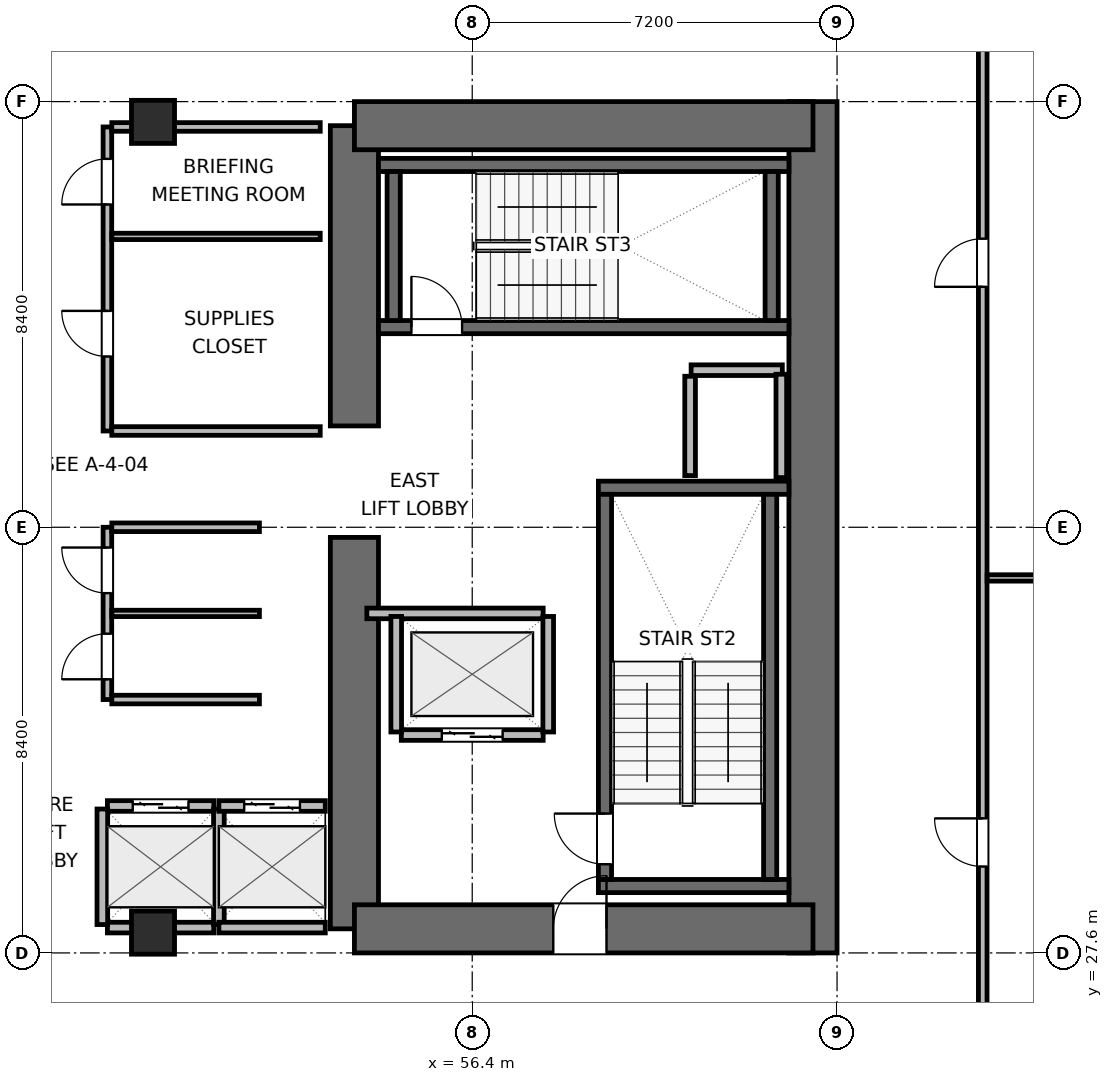
"""IFC4 building model, lengths in metres.
Left out: names, types, materials, properties, quantities, classifications, styles, units other than length and angle.
Written with IfcOpenShell. Run it as: python <this file> out.ifc"""

import sys

from ifc_helpers import new_model, si_unit, direction, frame, frame_2d, origin, origin_2d, place, context, subcontext, project, spatial, rectangle, extrude, element, fill, save


model = new_model("IFC4")
c1 = context("Model", 3, precision=1e-05, world=origin(), true_north=direction((0.0, 1.0)))
c2 = subcontext(c1, "Body", "Model", "MODEL_VIEW")
j1 = project(units=[si_unit("LENGTHUNIT", "METRE"), si_unit("PLANEANGLEUNIT", "RADIAN")], contexts=[c1])
p1 = place(None, origin())
s1 = spatial("IfcSite", under=j1, at=p1, CompositionType="ELEMENT")
p2 = place(p1, origin())
s2 = spatial("IfcBuilding", under=s1, at=p2, CompositionType="ELEMENT")
p3 = place(p2, frame((0.0, 0.0, 76.8)))
s3 = spatial("IfcBuildingStorey", under=s2, at=p3, CompositionType="ELEMENT", Elevation=76.8)
p4 = place(p3, frame((54.075, 28.075, 0.0), z_axis=(0.0, 0.0, 1.0), x_axis=(0.0, 1.0, 0.0)))
e1 = element("IfcWall", 1, at=p4, inside=s3, PredefinedType="SHEAR", context=c2, shape_type="SweptSolid", body=[
    extrude(rectangle(XDim=7.725, YDim=0.95, at=frame_2d((3.863, 0.0))), origin(), (0.0, 0.0, 1.0), 3.9),
])
p5 = place(p3, frame((54.075, 38.0, 0.0), z_axis=(0.0, 0.0, 1.0), x_axis=(0.0, 1.0, 0.0)))
e2 = element("IfcWall", 2, at=p5, inside=s3, PredefinedType="SHEAR", context=c2, shape_type="SweptSolid", body=[
    extrude(rectangle(XDim=5.925, YDim=0.95, at=frame_2d((2.962, 0.0))), origin(), (0.0, 0.0, 1.0), 3.9),
])
p6 = place(p3, frame((63.125, 27.6, 0.0), z_axis=(0.0, 0.0, 1.0), x_axis=(0.0, 1.0, 0.0)))
e3 = element("IfcWall", 3, at=p6, inside=s3, PredefinedType="SHEAR", context=c2, shape_type="SweptSolid", body=[
    extrude(rectangle(XDim=16.8, YDim=0.95, at=frame_2d((8.4, 0.0))), origin(), (0.0, 0.0, 1.0), 3.9),
])
p7 = place(p3, frame((54.075, 28.075, 0.0), z_axis=(0.0, 0.0, 1.0), x_axis=(1.0, 0.0, 0.0)))
e4 = element("IfcWall", 4, at=p7, inside=s3, PredefinedType="SHEAR", context=c2, shape_type="SweptSolid", body=[
    extrude(rectangle(XDim=9.05, YDim=0.95, at=frame_2d((4.525, 0.0))), origin(), (0.0, 0.0, 1.0), 3.9),
])
p8 = place(p7, frame((3.925, 0.0, 0.0)))
e5 = element("IfcOpeningElement", 5, at=p8, cuts=e4, PredefinedType="OPENING", context=c2, shape_type="SweptSolid", body=[
    extrude(rectangle(XDim=1.05, YDim=2.04, at=frame_2d((0.525, 1.02))), frame((0.0, 0.485, 0.0), z_axis=(0.0, -1.0, 0.0), x_axis=(1.0, 0.0, 0.0)), (0.0, 0.0, 1.0), 0.97),
])
p9 = place(p3, frame((54.075, 43.925, 0.0), z_axis=(0.0, 0.0, 1.0), x_axis=(1.0, 0.0, 0.0)))
e6 = element("IfcWall", 6, at=p9, inside=s3, PredefinedType="SHEAR", context=c2, shape_type="SweptSolid", body=[
    extrude(rectangle(XDim=9.05, YDim=0.95, at=frame_2d((4.525, 0.0))), origin(), (0.0, 0.0, 1.0), 3.9),
])
for number, where, z_axis, x_axis in (
    (7, (58.89, 28.92, 0.0), (0.0, 0.0, 1.0), (1.0, 0.0, 0.0)),
    (8, (58.89, 36.78, 0.0), (0.0, 0.0, 1.0), (1.0, 0.0, 0.0)),
):
    element("IfcWall", number, at=place(p3, frame(where, z_axis=z_axis, x_axis=x_axis)), inside=s3, PredefinedType="SHEAR", context=c2, shape_type="SweptSolid", body=[
        extrude(rectangle(XDim=3.76, YDim=0.26, at=frame_2d((1.88, 0.0))), origin(), (0.0, 0.0, 1.0), 3.9),
    ])
p10 = place(p3, frame((59.02, 29.05, 0.0), z_axis=(0.0, 0.0, 1.0), x_axis=(0.0, 1.0, 0.0)))
e9 = element("IfcWall", 9, at=p10, inside=s3, PredefinedType="SHEAR", context=c2, shape_type="SweptSolid", body=[
    extrude(rectangle(XDim=7.6, YDim=0.26, at=frame_2d((3.8, 0.0))), origin(), (0.0, 0.0, 1.0), 3.9),
])
p11 = place(p10, frame((0.3, 0.0, 0.0)))
e10 = element("IfcOpeningElement", 10, at=p11, cuts=e9, PredefinedType="OPENING", context=c2, shape_type="SweptSolid", body=[
    extrude(rectangle(XDim=1.0, YDim=2.04, at=frame_2d((0.5, 1.02))), frame((0.0, 0.14, 0.0), z_axis=(0.0, -1.0, 0.0), x_axis=(1.0, 0.0, 0.0)), (0.0, 0.0, 1.0), 0.28),
])
p12 = place(p3, frame((62.28, 29.05, 0.0), z_axis=(0.0, 0.0, 1.0), x_axis=(0.0, 1.0, 0.0)))
e11 = element("IfcWall", 11, at=p12, inside=s3, PredefinedType="SHEAR", context=c2, shape_type="SweptSolid", body=[
    extrude(rectangle(XDim=7.6, YDim=0.26, at=frame_2d((3.8, 0.0))), origin(), (0.0, 0.0, 1.0), 3.9),
])
p13 = place(p3, frame((54.55, 39.95, 0.0), z_axis=(0.0, 0.0, 1.0), x_axis=(1.0, 0.0, 0.0)))
e12 = element("IfcWall", 12, at=p13, inside=s3, PredefinedType="SHEAR", context=c2, shape_type="SweptSolid", body=[
    extrude(rectangle(XDim=8.1, YDim=0.26, at=frame_2d((4.05, 0.0))), origin(), (0.0, 0.0, 1.0), 3.9),
])
p14 = place(p13, frame((0.65, 0.0, 0.0)))
e13 = element("IfcOpeningElement", 13, at=p14, cuts=e12, PredefinedType="OPENING", context=c2, shape_type="SweptSolid", body=[
    extrude(rectangle(XDim=1.0, YDim=2.04, at=frame_2d((0.5, 1.02))), frame((0.0, 0.14, 0.0), z_axis=(0.0, -1.0, 0.0), x_axis=(1.0, 0.0, 0.0)), (0.0, 0.0, 1.0), 0.28),
])
p15 = place(p3, frame((54.55, 43.15, 0.0), z_axis=(0.0, 0.0, 1.0), x_axis=(1.0, 0.0, 0.0)))
e14 = element("IfcWall", 14, at=p15, inside=s3, PredefinedType="SHEAR", context=c2, shape_type="SweptSolid", body=[
    extrude(rectangle(XDim=8.1, YDim=0.26, at=frame_2d((4.05, 0.0))), origin(), (0.0, 0.0, 1.0), 3.9),
])
for number, where, z_axis, x_axis in (
    (15, (54.85, 40.08, 0.0), (0.0, 0.0, 1.0), (0.0, 1.0, 0.0)),
    (16, (62.31, 40.08, 0.0), (0.0, 0.0, 1.0), (0.0, 1.0, 0.0)),
):
    element("IfcWall", number, at=place(p3, frame(where, z_axis=z_axis, x_axis=x_axis)), inside=s3, PredefinedType="SHEAR", context=c2, shape_type="SweptSolid", body=[
        extrude(rectangle(XDim=2.94, YDim=0.26, at=frame_2d((1.47, 0.0))), origin(), (0.0, 0.0, 1.0), 3.9),
    ])
for number, where, z_axis, x_axis in (
    (17, (50.1, 28.0, 0.0), (0.0, 0.0, 1.0), (1.0, 0.0, 0.0)),
    (18, (50.1, 44.0, 0.0), (0.0, 0.0, 1.0), (1.0, 0.0, 0.0)),
):
    element("IfcColumn", number, at=place(p3, frame(where, z_axis=z_axis, x_axis=x_axis)), inside=s3, PredefinedType="COLUMN", context=c2, shape_type="SweptSolid", body=[
        extrude(rectangle(XDim=0.85, YDim=0.85, at=origin_2d()), origin(), (0.0, 0.0, 1.0), 3.9),
    ])
p16 = place(p3, frame((60.72, 39.1, 0.0), z_axis=(0.0, 0.0, 1.0), x_axis=(1.0, 0.0, 0.0)))
e19 = element("IfcWall", 19, at=p16, inside=s3, PredefinedType="PARTITIONING", context=c2, shape_type="SweptSolid", body=[
    extrude(rectangle(XDim=1.8, YDim=0.21, at=frame_2d((0.9, 0.0))), origin(), (0.0, 0.0, 1.0), 3.6),
])
p17 = place(p3, frame((60.7, 37.02, 0.0), z_axis=(0.0, 0.0, 1.0), x_axis=(0.0, 1.0, 0.0)))
e20 = element("IfcWall", 20, at=p17, inside=s3, PredefinedType="PARTITIONING", context=c2, shape_type="SweptSolid", body=[
    extrude(rectangle(XDim=1.96, YDim=0.21, at=frame_2d((0.98, 0.0))), origin(), (0.0, 0.0, 1.0), 3.6),
])
p18 = place(p3, frame((62.5, 36.98, 0.0), z_axis=(0.0, 0.0, 1.0), x_axis=(0.0, 1.0, 0.0)))
e21 = element("IfcWall", 21, at=p18, inside=s3, PredefinedType="PARTITIONING", context=c2, shape_type="SweptSolid", body=[
    extrude(rectangle(XDim=2.04, YDim=0.21, at=frame_2d((1.02, 0.0))), origin(), (0.0, 0.0, 1.0), 3.6),
])
p19 = place(p3, frame((55.0, 31.9, 0.0), z_axis=(0.0, 0.0, 1.0), x_axis=(1.0, 0.0, 0.0)))
e22 = element("IfcWall", 22, at=p19, inside=s3, PredefinedType="PARTITIONING", context=c2, shape_type="SweptSolid", body=[
    extrude(rectangle(XDim=2.8, YDim=0.21, at=frame_2d((1.4, 0.0))), origin(), (0.0, 0.0, 1.0), 3.6),
])
p20 = place(p19, frame((0.8, 0.0, 0.0)))
e23 = element("IfcOpeningElement", 23, at=p20, cuts=e22, PredefinedType="OPENING", context=c2, shape_type="SweptSolid", body=[
    extrude(rectangle(XDim=1.2, YDim=2.04, at=frame_2d((0.6, 1.02))), frame((0.0, 0.115, 0.0), z_axis=(0.0, -1.0, 0.0), x_axis=(1.0, 0.0, 0.0)), (0.0, 0.0, 1.0), 0.23),
])
p21 = place(p3, frame((54.32, 34.3, 0.0), z_axis=(0.0, 0.0, 1.0), x_axis=(1.0, 0.0, 0.0)))
e24 = element("IfcWall", 24, at=p21, inside=s3, PredefinedType="PARTITIONING", context=c2, shape_type="SweptSolid", body=[
    extrude(rectangle(XDim=3.48, YDim=0.21, at=frame_2d((1.74, 0.0))), origin(), (0.0, 0.0, 1.0), 3.6),
])
for number, where, z_axis, x_axis in (
    (25, (54.9, 31.96, 0.0), (0.0, 0.0, 1.0), (0.0, 1.0, 0.0)),
    (26, (57.9, 31.96, 0.0), (0.0, 0.0, 1.0), (0.0, 1.0, 0.0)),
):
    element("IfcWall", number, at=place(p3, frame(where, z_axis=z_axis, x_axis=x_axis)), inside=s3, PredefinedType="PARTITIONING", context=c2, shape_type="SweptSolid", body=[
        extrude(rectangle(XDim=2.28, YDim=0.21, at=frame_2d((1.14, 0.0))), origin(), (0.0, 0.0, 1.0), 3.6),
    ])
p22 = place(p3, frame((49.2, 30.5, 0.0), z_axis=(0.0, 0.0, 1.0), x_axis=(1.0, 0.0, 0.0)))
e27 = element("IfcWall", 27, at=p22, inside=s3, PredefinedType="PARTITIONING", context=c2, shape_type="SweptSolid", body=[
    extrude(rectangle(XDim=2.1, YDim=0.21, at=frame_2d((1.05, 0.0))), origin(), (0.0, 0.0, 1.0), 3.6),
])
p23 = place(p22, frame((0.5, 0.0, 0.0)))
e28 = element("IfcOpeningElement", 28, at=p23, cuts=e27, PredefinedType="OPENING", context=c2, shape_type="SweptSolid", body=[
    extrude(rectangle(XDim=1.1, YDim=2.04, at=frame_2d((0.55, 1.02))), frame((0.0, 0.115, 0.0), z_axis=(0.0, -1.0, 0.0), x_axis=(1.0, 0.0, 0.0)), (0.0, 0.0, 1.0), 0.23),
])
p24 = place(p3, frame((49.2, 28.1, 0.0), z_axis=(0.0, 0.0, 1.0), x_axis=(1.0, 0.0, 0.0)))
e29 = element("IfcWall", 29, at=p24, inside=s3, PredefinedType="PARTITIONING", context=c2, shape_type="SweptSolid", body=[
    extrude(rectangle(XDim=2.1, YDim=0.21, at=frame_2d((1.05, 0.0))), origin(), (0.0, 0.0, 1.0), 2.485),
])
for number, where, z_axis, x_axis in (
    (30, (49.1, 28.16, 0.0), (0.0, 0.0, 1.0), (0.0, 1.0, 0.0)),
    (31, (51.4, 28.16, 0.0), (0.0, 0.0, 1.0), (0.0, 1.0, 0.0)),
):
    element("IfcWall", number, at=place(p3, frame(where, z_axis=z_axis, x_axis=x_axis)), inside=s3, PredefinedType="PARTITIONING", context=c2, shape_type="SweptSolid", body=[
        extrude(rectangle(XDim=2.28, YDim=0.21, at=frame_2d((1.14, 0.0))), origin(), (0.0, 0.0, 1.0), 3.6),
    ])
p25 = place(p3, frame((51.4, 30.5, 0.0), z_axis=(0.0, 0.0, 1.0), x_axis=(1.0, 0.0, 0.0)))
e32 = element("IfcWall", 32, at=p25, inside=s3, PredefinedType="PARTITIONING", context=c2, shape_type="SweptSolid", body=[
    extrude(rectangle(XDim=2.1, YDim=0.21, at=frame_2d((1.05, 0.0))), origin(), (0.0, 0.0, 1.0), 3.6),
])
p26 = place(p25, frame((0.5, 0.0, 0.0)))
e33 = element("IfcOpeningElement", 33, at=p26, cuts=e32, PredefinedType="OPENING", context=c2, shape_type="SweptSolid", body=[
    extrude(rectangle(XDim=1.1, YDim=2.04, at=frame_2d((0.55, 1.02))), frame((0.0, 0.115, 0.0), z_axis=(0.0, -1.0, 0.0), x_axis=(1.0, 0.0, 0.0)), (0.0, 0.0, 1.0), 0.23),
])
p27 = place(p3, frame((51.4, 28.1, 0.0), z_axis=(0.0, 0.0, 1.0), x_axis=(1.0, 0.0, 0.0)))
e34 = element("IfcWall", 34, at=p27, inside=s3, PredefinedType="PARTITIONING", context=c2, shape_type="SweptSolid", body=[
    extrude(rectangle(XDim=2.1, YDim=0.21, at=frame_2d((1.05, 0.0))), origin(), (0.0, 0.0, 1.0), 2.485),
])
p28 = place(p3, frame((49.2, 32.6, 0.0), z_axis=(0.0, 0.0, 1.0), x_axis=(0.0, 1.0, 0.0)))
e35 = element("IfcWall", 35, at=p28, inside=s3, PredefinedType="PARTITIONING", context=c2, shape_type="SweptSolid", body=[
    extrude(rectangle(XDim=3.4, YDim=0.17, at=frame_2d((1.7, 0.0))), origin(), (0.0, 0.0, 1.0), 3.6),
])
p29 = place(p28, frame((0.4, 0.0, 0.0)))
e36 = element("IfcOpeningElement", 36, at=p29, cuts=e35, PredefinedType="OPENING", context=c2, shape_type="SweptSolid", body=[
    extrude(rectangle(XDim=0.9, YDim=2.02, at=frame_2d((0.45, 1.01))), frame((0.0, 0.095, 0.0), z_axis=(0.0, -1.0, 0.0), x_axis=(1.0, 0.0, 0.0)), (0.0, 0.0, 1.0), 0.19),
])
p30 = place(p28, frame((2.1, 0.0, 0.0)))
e37 = element("IfcOpeningElement", 37, at=p30, cuts=e35, PredefinedType="OPENING", context=c2, shape_type="SweptSolid", body=[
    extrude(rectangle(XDim=0.9, YDim=2.02, at=frame_2d((0.45, 1.01))), frame((0.0, 0.095, 0.0), z_axis=(0.0, -1.0, 0.0), x_axis=(1.0, 0.0, 0.0)), (0.0, 0.0, 1.0), 0.19),
])
for number, where, z_axis, x_axis in (
    (38, (49.287, 32.6, 0.0), (0.0, 0.0, 1.0), (1.0, 0.0, 0.0)),
    (39, (49.287, 36.0, 0.0), (0.0, 0.0, 1.0), (1.0, 0.0, 0.0)),
):
    element("IfcWall", number, at=place(p3, frame(where, z_axis=z_axis, x_axis=x_axis)), inside=s3, PredefinedType="PARTITIONING", context=c2, shape_type="SweptSolid", body=[
        extrude(rectangle(XDim=2.913, YDim=0.17, at=frame_2d((1.457, 0.0))), origin(), (0.0, 0.0, 1.0), 3.6),
    ])
p31 = place(p3, frame((49.287, 34.3, 0.0), z_axis=(0.0, 0.0, 1.0), x_axis=(1.0, 0.0, 0.0)))
e40 = element("IfcWall", 40, at=p31, inside=s3, PredefinedType="PARTITIONING", context=c2, shape_type="SweptSolid", body=[
    extrude(rectangle(XDim=2.913, YDim=0.125, at=frame_2d((1.457, 0.0))), origin(), (0.0, 0.0, 1.0), 3.6),
])
p32 = place(p3, frame((49.2, 37.9, 0.0), z_axis=(0.0, 0.0, 1.0), x_axis=(0.0, 1.0, 0.0)))
e41 = element("IfcWall", 41, at=p32, inside=s3, PredefinedType="PARTITIONING", context=c2, shape_type="SweptSolid", body=[
    extrude(rectangle(XDim=6.0, YDim=0.17, at=frame_2d((3.0, 0.0))), origin(), (0.0, 0.0, 1.0), 3.6),
])
p33 = place(p32, frame((1.47, 0.0, 0.0)))
e42 = element("IfcOpeningElement", 42, at=p33, cuts=e41, PredefinedType="OPENING", context=c2, shape_type="SweptSolid", body=[
    extrude(rectangle(XDim=0.9, YDim=2.02, at=frame_2d((0.45, 1.01))), frame((0.0, 0.095, 0.0), z_axis=(0.0, -1.0, 0.0), x_axis=(1.0, 0.0, 0.0)), (0.0, 0.0, 1.0), 0.19),
])
p34 = place(p32, frame((4.47, 0.0, 0.0)))
e43 = element("IfcOpeningElement", 43, at=p34, cuts=e41, PredefinedType="OPENING", context=c2, shape_type="SweptSolid", body=[
    extrude(rectangle(XDim=0.9, YDim=2.02, at=frame_2d((0.45, 1.01))), frame((0.0, 0.095, 0.0), z_axis=(0.0, -1.0, 0.0), x_axis=(1.0, 0.0, 0.0)), (0.0, 0.0, 1.0), 0.19),
])
p35 = place(p3, frame((49.287, 37.9, 0.0), z_axis=(0.0, 0.0, 1.0), x_axis=(1.0, 0.0, 0.0)))
e44 = element("IfcWall", 44, at=p35, inside=s3, PredefinedType="PARTITIONING", context=c2, shape_type="SweptSolid", body=[
    extrude(rectangle(XDim=4.113, YDim=0.17, at=frame_2d((2.056, 0.0))), origin(), (0.0, 0.0, 1.0), 3.6),
])
p36 = place(p3, frame((49.287, 43.9, 0.0), z_axis=(0.0, 0.0, 1.0), x_axis=(1.0, 0.0, 0.0)))
e45 = element("IfcWall", 45, at=p36, inside=s3, PredefinedType="PARTITIONING", context=c2, shape_type="SweptSolid", body=[
    extrude(rectangle(XDim=4.113, YDim=0.17, at=frame_2d((2.056, 0.0))), origin(), (0.0, 0.0, 1.0), 2.485),
])
p37 = place(p3, frame((49.287, 41.74, 0.0), z_axis=(0.0, 0.0, 1.0), x_axis=(1.0, 0.0, 0.0)))
e46 = element("IfcWall", 46, at=p37, inside=s3, PredefinedType="PARTITIONING", context=c2, shape_type="SweptSolid", body=[
    extrude(rectangle(XDim=4.113, YDim=0.125, at=frame_2d((2.056, 0.0))), origin(), (0.0, 0.0, 1.0), 3.6),
])
p38 = place(p3, frame((66.475, 24.647, 0.0), z_axis=(0.0, 0.0, 1.0), x_axis=(0.0, 1.0, 0.0)))
e47 = element("IfcWall", 47, at=p38, inside=s3, PredefinedType="PARTITIONING", context=c2, shape_type="SweptSolid", body=[
    extrude(rectangle(XDim=22.706, YDim=0.17, at=frame_2d((11.353, 0.0))), origin(), (0.0, 0.0, 1.0), 3.6),
])
p39 = place(p38, frame((4.658, 0.0, 0.0)))
e48 = element("IfcOpeningElement", 48, at=p39, cuts=e47, PredefinedType="OPENING", context=c2, shape_type="SweptSolid", body=[
    extrude(rectangle(XDim=0.95, YDim=2.04, at=frame_2d((0.475, 1.02))), frame((0.0, 0.095, 0.0), z_axis=(0.0, -1.0, 0.0), x_axis=(1.0, 0.0, 0.0)), (0.0, 0.0, 1.0), 0.19),
])
p40 = place(p38, frame((16.098, 0.0, 0.0)))
e49 = element("IfcOpeningElement", 49, at=p40, cuts=e47, PredefinedType="OPENING", context=c2, shape_type="SweptSolid", body=[
    extrude(rectangle(XDim=0.95, YDim=2.04, at=frame_2d((0.475, 1.02))), frame((0.0, 0.095, 0.0), z_axis=(0.0, -1.0, 0.0), x_axis=(1.0, 0.0, 0.0)), (0.0, 0.0, 1.0), 0.19),
])
p41 = place(p3, frame((66.562, 35.0, 0.0), z_axis=(0.0, 0.0, 1.0), x_axis=(1.0, 0.0, 0.0)))
e50 = element("IfcWall", 50, at=p41, inside=s3, PredefinedType="PARTITIONING", context=c2, shape_type="SweptSolid", body=[
    extrude(rectangle(XDim=12.393, YDim=0.125, at=frame_2d((6.197, 0.0))), origin(), (0.0, 0.0, 1.0), 3.6),
])
p42 = place(p11, origin())
e51 = element("IfcDoor", 51, at=p42, inside=s3, OperationType="SINGLE_SWING_RIGHT", PredefinedType="DOOR", context=c2, shape_type="SweptSolid", body=[
    extrude(rectangle(XDim=1.0, YDim=2.04, at=frame_2d((0.5, 1.02))), frame((0.0, 0.025, 0.0), z_axis=(0.0, -1.0, 0.0), x_axis=(1.0, 0.0, 0.0)), (0.0, 0.0, 1.0), 0.05),
])
fill(e10, e51)
p43 = place(p14, origin())
e52 = element("IfcDoor", 52, at=p43, inside=s3, OperationType="SINGLE_SWING_LEFT", PredefinedType="DOOR", context=c2, shape_type="SweptSolid", body=[
    extrude(rectangle(XDim=1.0, YDim=2.04, at=frame_2d((0.5, 1.02))), frame((0.0, 0.025, 0.0), z_axis=(0.0, -1.0, 0.0), x_axis=(1.0, 0.0, 0.0)), (0.0, 0.0, 1.0), 0.05),
])
fill(e13, e52)
p44 = place(p20, origin())
e53 = element("IfcDoor", 53, at=p44, inside=s3, OperationType="DOUBLE_DOOR_SLIDING", PredefinedType="DOOR", context=c2, shape_type="SweptSolid", body=[
    extrude(rectangle(XDim=1.2, YDim=2.04, at=frame_2d((0.6, 1.02))), frame((0.0, 0.025, 0.0), z_axis=(0.0, -1.0, 0.0), x_axis=(1.0, 0.0, 0.0)), (0.0, 0.0, 1.0), 0.05),
])
fill(e23, e53)
p45 = place(p23, origin())
e54 = element("IfcDoor", 54, at=p45, inside=s3, OperationType="DOUBLE_DOOR_SLIDING", PredefinedType="DOOR", context=c2, shape_type="SweptSolid", body=[
    extrude(rectangle(XDim=1.1, YDim=2.04, at=frame_2d((0.55, 1.02))), frame((0.0, 0.025, 0.0), z_axis=(0.0, -1.0, 0.0), x_axis=(1.0, 0.0, 0.0)), (0.0, 0.0, 1.0), 0.05),
])
fill(e28, e54)
p46 = place(p26, origin())
e55 = element("IfcDoor", 55, at=p46, inside=s3, OperationType="DOUBLE_DOOR_SLIDING", PredefinedType="DOOR", context=c2, shape_type="SweptSolid", body=[
    extrude(rectangle(XDim=1.1, YDim=2.04, at=frame_2d((0.55, 1.02))), frame((0.0, 0.025, 0.0), z_axis=(0.0, -1.0, 0.0), x_axis=(1.0, 0.0, 0.0)), (0.0, 0.0, 1.0), 0.05),
])
fill(e33, e55)
p47 = place(p8, origin())
e56 = element("IfcDoor", 56, at=p47, inside=s3, OperationType="SINGLE_SWING_RIGHT", PredefinedType="DOOR", context=c2, shape_type="SweptSolid", body=[
    extrude(rectangle(XDim=1.05, YDim=2.04, at=frame_2d((0.525, 1.02))), frame((0.0, 0.025, 0.0), z_axis=(0.0, -1.0, 0.0), x_axis=(1.0, 0.0, 0.0)), (0.0, 0.0, 1.0), 0.05),
])
fill(e5, e56)
p48 = place(p29, origin())
e57 = element("IfcDoor", 57, at=p48, inside=s3, OperationType="SINGLE_SWING_LEFT", PredefinedType="DOOR", context=c2, shape_type="SweptSolid", body=[
    extrude(rectangle(XDim=0.9, YDim=2.02, at=frame_2d((0.45, 1.01))), frame((0.0, 0.025, 0.0), z_axis=(0.0, -1.0, 0.0), x_axis=(1.0, 0.0, 0.0)), (0.0, 0.0, 1.0), 0.05),
])
fill(e36, e57)
p49 = place(p30, origin())
e58 = element("IfcDoor", 58, at=p49, inside=s3, OperationType="SINGLE_SWING_RIGHT", PredefinedType="DOOR", context=c2, shape_type="SweptSolid", body=[
    extrude(rectangle(XDim=0.9, YDim=2.02, at=frame_2d((0.45, 1.01))), frame((0.0, 0.025, 0.0), z_axis=(0.0, -1.0, 0.0), x_axis=(1.0, 0.0, 0.0)), (0.0, 0.0, 1.0), 0.05),
])
fill(e37, e58)
p50 = place(p33, origin())
e59 = element("IfcDoor", 59, at=p50, inside=s3, OperationType="SINGLE_SWING_RIGHT", PredefinedType="DOOR", context=c2, shape_type="SweptSolid", body=[
    extrude(rectangle(XDim=0.9, YDim=2.02, at=frame_2d((0.45, 1.01))), frame((0.0, 0.025, 0.0), z_axis=(0.0, -1.0, 0.0), x_axis=(1.0, 0.0, 0.0)), (0.0, 0.0, 1.0), 0.05),
])
fill(e42, e59)
p51 = place(p34, origin())
e60 = element("IfcDoor", 60, at=p51, inside=s3, OperationType="SINGLE_SWING_LEFT", PredefinedType="DOOR", context=c2, shape_type="SweptSolid", body=[
    extrude(rectangle(XDim=0.9, YDim=2.02, at=frame_2d((0.45, 1.01))), frame((0.0, 0.025, 0.0), z_axis=(0.0, -1.0, 0.0), x_axis=(1.0, 0.0, 0.0)), (0.0, 0.0, 1.0), 0.05),
])
fill(e43, e60)
p52 = place(p39, origin())
e61 = element("IfcDoor", 61, at=p52, inside=s3, OperationType="SINGLE_SWING_RIGHT", PredefinedType="DOOR", context=c2, shape_type="SweptSolid", body=[
    extrude(rectangle(XDim=0.95, YDim=2.04, at=frame_2d((0.475, 1.02))), frame((0.0, 0.025, 0.0), z_axis=(0.0, -1.0, 0.0), x_axis=(1.0, 0.0, 0.0)), (0.0, 0.0, 1.0), 0.05),
])
fill(e48, e61)
p53 = place(p40, origin())
e62 = element("IfcDoor", 62, at=p53, inside=s3, OperationType="SINGLE_SWING_LEFT", PredefinedType="DOOR", context=c2, shape_type="SweptSolid", body=[
    extrude(rectangle(XDim=0.95, YDim=2.04, at=frame_2d((0.475, 1.02))), frame((0.0, 0.025, 0.0), z_axis=(0.0, -1.0, 0.0), x_axis=(1.0, 0.0, 0.0)), (0.0, 0.0, 1.0), 0.05),
])
fill(e49, e62)
save(model, sys.argv[1])
